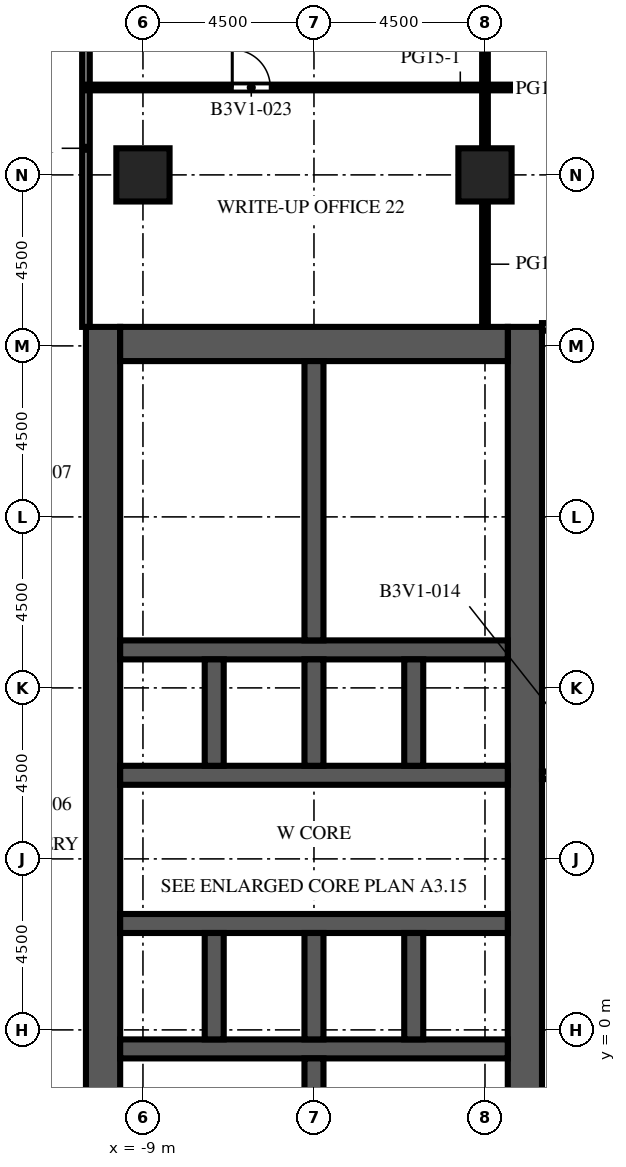
"""IFC4 building model, lengths in metres.
Left out: names, types, materials, properties, quantities, classifications, styles, units other than length and angle.
Written with IfcOpenShell. Run it as: python <this file> out.ifc"""

import sys

from ifc_helpers import new_model, si_unit, direction, frame, frame_2d, origin, origin_2d, place, context, subcontext, project, spatial, rectangle, extrude, element, fill, save


model = new_model("IFC4")
c1 = context("Model", 3, precision=1e-05, world=origin(), true_north=direction((0.0, 1.0)))
c2 = subcontext(c1, "Body", "Model", "MODEL_VIEW")
j1 = project(units=[si_unit("LENGTHUNIT", "METRE"), si_unit("PLANEANGLEUNIT", "RADIAN")], contexts=[c1])
p1 = place(None, origin())
s1 = spatial("IfcSite", under=j1, at=p1, CompositionType="ELEMENT")
p2 = place(p1, origin())
s2 = spatial("IfcBuilding", under=s1, at=p2, CompositionType="ELEMENT")
p3 = place(p2, frame((0.0, 0.0, 86.1)))
s3 = spatial("IfcBuildingStorey", under=s2, at=p3, CompositionType="ELEMENT", Elevation=86.1)
for number, where, z_axis, x_axis in (
    (1, (-9.0, 22.5, 0.0), (0.0, 0.0, 1.0), (1.0, 0.0, 0.0)),
    (2, (0.0, 22.5, 0.0), (0.0, 0.0, 1.0), (1.0, 0.0, 0.0)),
):
    element("IfcColumn", number, at=place(p3, frame(where, z_axis=z_axis, x_axis=x_axis)), inside=s3, PredefinedType="COLUMN", context=c2, shape_type="SweptSolid", body=[
        extrude(rectangle(XDim=1.4, YDim=1.4, at=origin_2d()), origin(), (0.0, 0.0, 1.0), 4.1),
    ])
p4 = place(p3, frame((-10.05, -9.0, 0.0), z_axis=(0.0, 0.0, 1.0), x_axis=(0.0, 1.0, 0.0)))
e3 = element("IfcWall", 3, at=p4, inside=s3, PredefinedType="SHEAR", context=c2, shape_type="SweptSolid", body=[
    extrude(rectangle(XDim=27.5, YDim=0.9, at=frame_2d((13.75, 0.0))), origin(), (0.0, 0.0, 1.0), 4.1),
])
p5 = place(p4, frame((12.55, 0.0, 0.0)))
e4 = element("IfcOpeningElement", 4, at=p5, cuts=e3, PredefinedType="OPENING", context=c2, shape_type="SweptSolid", body=[
    extrude(rectangle(XDim=2.4, YDim=2.4, at=frame_2d((1.2, 1.2))), frame((0.0, 0.46, 0.0), z_axis=(0.0, -1.0, 0.0), x_axis=(1.0, 0.0, 0.0)), (0.0, 0.0, 1.0), 0.92),
])
p6 = place(p4, frame((6.825, 0.0, 0.0)))
e5 = element("IfcOpeningElement", 5, at=p6, cuts=e3, PredefinedType="OPENING", context=c2, shape_type="SweptSolid", body=[
    extrude(rectangle(XDim=1.2, YDim=2.1, at=frame_2d((0.6, 1.05))), frame((0.0, 0.46, 0.0), z_axis=(0.0, -1.0, 0.0), x_axis=(1.0, 0.0, 0.0)), (0.0, 0.0, 1.0), 0.92),
])
p7 = place(p4, frame((19.475, 0.0, 0.0)))
e6 = element("IfcOpeningElement", 6, at=p7, cuts=e3, PredefinedType="OPENING", context=c2, shape_type="SweptSolid", body=[
    extrude(rectangle(XDim=1.2, YDim=2.1, at=frame_2d((0.6, 1.05))), frame((0.0, 0.46, 0.0), z_axis=(0.0, -1.0, 0.0), x_axis=(1.0, 0.0, 0.0)), (0.0, 0.0, 1.0), 0.92),
])
p8 = place(p3, frame((1.05, -9.0, 0.0), z_axis=(0.0, 0.0, 1.0), x_axis=(0.0, 1.0, 0.0)))
e7 = element("IfcWall", 7, at=p8, inside=s3, PredefinedType="SHEAR", context=c2, shape_type="SweptSolid", body=[
    extrude(rectangle(XDim=27.5, YDim=0.9, at=frame_2d((13.75, 0.0))), origin(), (0.0, 0.0, 1.0), 4.1),
])
p9 = place(p8, frame((12.55, 0.0, 0.0)))
e8 = element("IfcOpeningElement", 8, at=p9, cuts=e7, PredefinedType="OPENING", context=c2, shape_type="SweptSolid", body=[
    extrude(rectangle(XDim=2.4, YDim=2.4, at=frame_2d((1.2, 1.2))), frame((0.0, 0.46, 0.0), z_axis=(0.0, -1.0, 0.0), x_axis=(1.0, 0.0, 0.0)), (0.0, 0.0, 1.0), 0.92),
])
p10 = place(p8, frame((3.975, 0.0, 0.0)))
e9 = element("IfcOpeningElement", 9, at=p10, cuts=e7, PredefinedType="OPENING", context=c2, shape_type="SweptSolid", body=[
    extrude(rectangle(XDim=1.2, YDim=2.1, at=frame_2d((0.6, 1.05))), frame((0.0, 0.46, 0.0), z_axis=(0.0, -1.0, 0.0), x_axis=(1.0, 0.0, 0.0)), (0.0, 0.0, 1.0), 0.92),
])
p11 = place(p8, frame((22.325, 0.0, 0.0)))
e10 = element("IfcOpeningElement", 10, at=p11, cuts=e7, PredefinedType="OPENING", context=c2, shape_type="SweptSolid", body=[
    extrude(rectangle(XDim=1.2, YDim=2.1, at=frame_2d((0.6, 1.05))), frame((0.0, 0.46, 0.0), z_axis=(0.0, -1.0, 0.0), x_axis=(1.0, 0.0, 0.0)), (0.0, 0.0, 1.0), 0.92),
])
p12 = place(p3, frame((-9.6, 18.05, 0.0), z_axis=(0.0, 0.0, 1.0), x_axis=(1.0, 0.0, 0.0)))
e11 = element("IfcWall", 11, at=p12, inside=s3, PredefinedType="SHEAR", context=c2, shape_type="SweptSolid", body=[
    extrude(rectangle(XDim=10.2, YDim=0.9, at=frame_2d((5.1, 0.0))), origin(), (0.0, 0.0, 1.0), 4.1),
])
p13 = place(p3, frame((-9.6, -0.5, 0.0), z_axis=(0.0, 0.0, 1.0), x_axis=(1.0, 0.0, 0.0)))
e12 = element("IfcWall", 12, at=p13, inside=s3, PredefinedType="SHEAR", context=c2, shape_type="SweptSolid", body=[
    extrude(rectangle(XDim=10.2, YDim=0.5, at=frame_2d((5.1, 0.0))), origin(), (0.0, 0.0, 1.0), 4.1),
])
p14 = place(p3, frame((-9.6, 2.8, 0.0), z_axis=(0.0, 0.0, 1.0), x_axis=(1.0, 0.0, 0.0)))
e13 = element("IfcWall", 13, at=p14, inside=s3, PredefinedType="SHEAR", context=c2, shape_type="SweptSolid", body=[
    extrude(rectangle(XDim=10.2, YDim=0.5, at=frame_2d((5.1, 0.0))), origin(), (0.0, 0.0, 1.0), 4.1),
])
p15 = place(p14, frame((0.562, 0.0, 0.0)))
e14 = element("IfcOpeningElement", 14, at=p15, cuts=e13, PredefinedType="OPENING", context=c2, shape_type="SweptSolid", body=[
    extrude(rectangle(XDim=1.1, YDim=2.1, at=frame_2d((0.55, 1.05))), frame((0.0, 0.26, 0.0), z_axis=(0.0, -1.0, 0.0), x_axis=(1.0, 0.0, 0.0)), (0.0, 0.0, 1.0), 0.52),
])
p16 = place(p14, frame((3.238, 0.0, 0.0)))
e15 = element("IfcOpeningElement", 15, at=p16, cuts=e13, PredefinedType="OPENING", context=c2, shape_type="SweptSolid", body=[
    extrude(rectangle(XDim=1.1, YDim=2.1, at=frame_2d((0.55, 1.05))), frame((0.0, 0.26, 0.0), z_axis=(0.0, -1.0, 0.0), x_axis=(1.0, 0.0, 0.0)), (0.0, 0.0, 1.0), 0.52),
])
p17 = place(p14, frame((8.538, 0.0, 0.0)))
e16 = element("IfcOpeningElement", 16, at=p17, cuts=e13, PredefinedType="OPENING", context=c2, shape_type="SweptSolid", body=[
    extrude(rectangle(XDim=1.1, YDim=2.1, at=frame_2d((0.55, 1.05))), frame((0.0, 0.26, 0.0), z_axis=(0.0, -1.0, 0.0), x_axis=(1.0, 0.0, 0.0)), (0.0, 0.0, 1.0), 0.52),
])
p18 = place(p3, frame((-9.6, 6.7, 0.0), z_axis=(0.0, 0.0, 1.0), x_axis=(1.0, 0.0, 0.0)))
e17 = element("IfcWall", 17, at=p18, inside=s3, PredefinedType="SHEAR", context=c2, shape_type="SweptSolid", body=[
    extrude(rectangle(XDim=10.2, YDim=0.5, at=frame_2d((5.1, 0.0))), origin(), (0.0, 0.0, 1.0), 4.1),
])
p19 = place(p18, frame((0.562, 0.0, 0.0)))
e18 = element("IfcOpeningElement", 18, at=p19, cuts=e17, PredefinedType="OPENING", context=c2, shape_type="SweptSolid", body=[
    extrude(rectangle(XDim=1.1, YDim=2.1, at=frame_2d((0.55, 1.05))), frame((0.0, 0.26, 0.0), z_axis=(0.0, -1.0, 0.0), x_axis=(1.0, 0.0, 0.0)), (0.0, 0.0, 1.0), 0.52),
])
p20 = place(p18, frame((3.288, 0.0, 0.0)))
e19 = element("IfcOpeningElement", 19, at=p20, cuts=e17, PredefinedType="OPENING", context=c2, shape_type="SweptSolid", body=[
    extrude(rectangle(XDim=1.0, YDim=2.1, at=frame_2d((0.5, 1.05))), frame((0.0, 0.26, 0.0), z_axis=(0.0, -1.0, 0.0), x_axis=(1.0, 0.0, 0.0)), (0.0, 0.0, 1.0), 0.52),
])
p21 = place(p18, frame((5.913, 0.0, 0.0)))
e20 = element("IfcOpeningElement", 20, at=p21, cuts=e17, PredefinedType="OPENING", context=c2, shape_type="SweptSolid", body=[
    extrude(rectangle(XDim=1.0, YDim=2.1, at=frame_2d((0.5, 1.05))), frame((0.0, 0.26, 0.0), z_axis=(0.0, -1.0, 0.0), x_axis=(1.0, 0.0, 0.0)), (0.0, 0.0, 1.0), 0.52),
])
p22 = place(p18, frame((8.587, 0.0, 0.0)))
e21 = element("IfcOpeningElement", 21, at=p22, cuts=e17, PredefinedType="OPENING", context=c2, shape_type="SweptSolid", body=[
    extrude(rectangle(XDim=1.0, YDim=2.1, at=frame_2d((0.5, 1.05))), frame((0.0, 0.26, 0.0), z_axis=(0.0, -1.0, 0.0), x_axis=(1.0, 0.0, 0.0)), (0.0, 0.0, 1.0), 0.52),
])
p23 = place(p3, frame((-9.6, 10.0, 0.0), z_axis=(0.0, 0.0, 1.0), x_axis=(1.0, 0.0, 0.0)))
e22 = element("IfcWall", 22, at=p23, inside=s3, PredefinedType="SHEAR", context=c2, shape_type="SweptSolid", body=[
    extrude(rectangle(XDim=10.2, YDim=0.5, at=frame_2d((5.1, 0.0))), origin(), (0.0, 0.0, 1.0), 4.1),
])
for number, where, z_axis, x_axis in (
    (23, (-7.125, -0.25, 0.0), (0.0, 0.0, 1.0), (0.0, 1.0, 0.0)),
    (24, (-7.125, 6.95, 0.0), (0.0, 0.0, 1.0), (0.0, 1.0, 0.0)),
    (25, (-4.5, -0.25, 0.0), (0.0, 0.0, 1.0), (0.0, 1.0, 0.0)),
    (26, (-4.5, 6.95, 0.0), (0.0, 0.0, 1.0), (0.0, 1.0, 0.0)),
    (27, (-1.875, -0.25, 0.0), (0.0, 0.0, 1.0), (0.0, 1.0, 0.0)),
    (28, (-1.875, 6.95, 0.0), (0.0, 0.0, 1.0), (0.0, 1.0, 0.0)),
):
    element("IfcWall", number, at=place(p3, frame(where, z_axis=z_axis, x_axis=x_axis)), inside=s3, PredefinedType="SHEAR", context=c2, shape_type="SweptSolid", body=[
        extrude(rectangle(XDim=2.8, YDim=0.5, at=frame_2d((1.4, 0.0))), origin(), (0.0, 0.0, 1.0), 4.1),
    ])
for number, where, z_axis, x_axis in (
    (29, (-4.5, -8.1, 0.0), (0.0, 0.0, 1.0), (0.0, 1.0, 0.0)),
    (30, (-4.5, 10.25, 0.0), (0.0, 0.0, 1.0), (0.0, 1.0, 0.0)),
):
    element("IfcWall", number, at=place(p3, frame(where, z_axis=z_axis, x_axis=x_axis)), inside=s3, PredefinedType="SHEAR", context=c2, shape_type="SweptSolid", body=[
        extrude(rectangle(XDim=7.35, YDim=0.5, at=frame_2d((3.675, 0.0))), origin(), (0.0, 0.0, 1.0), 4.1),
    ])
p24 = place(p3, frame((-0.9, -3.543, 0.0), z_axis=(0.0, 0.0, 1.0), x_axis=(0.0, 1.0, 0.0)))
e31 = element("IfcWall", 31, at=p24, inside=s3, PredefinedType="PARTITIONING", context=c2, shape_type="SweptSolid", body=[
    extrude(rectangle(XDim=2.793, YDim=0.1, at=frame_2d((1.396, 0.0))), origin(), (0.0, 0.0, 1.0), 3.65),
])
p25 = place(p24, frame((0.896, 0.0, 0.0)))
e32 = element("IfcOpeningElement", 32, at=p25, cuts=e31, PredefinedType="OPENING", context=c2, shape_type="SweptSolid", body=[
    extrude(rectangle(XDim=1.0, YDim=2.1, at=frame_2d((0.5, 1.05))), frame((0.0, 0.06, 0.0), z_axis=(0.0, -1.0, 0.0), x_axis=(1.0, 0.0, 0.0)), (0.0, 0.0, 1.0), 0.12),
])
p26 = place(p3, frame((-0.8, 10.25, 0.0), z_axis=(0.0, 0.0, 1.0), x_axis=(0.0, 1.0, 0.0)))
e33 = element("IfcWall", 33, at=p26, inside=s3, PredefinedType="PARTITIONING", context=c2, shape_type="SweptSolid", body=[
    extrude(rectangle(XDim=2.205, YDim=0.1, at=frame_2d((1.103, 0.0))), origin(), (0.0, 0.0, 1.0), 3.65),
])
p27 = place(p26, frame((0.603, 0.0, 0.0)))
e34 = element("IfcOpeningElement", 34, at=p27, cuts=e33, PredefinedType="OPENING", context=c2, shape_type="SweptSolid", body=[
    extrude(rectangle(XDim=1.0, YDim=2.1, at=frame_2d((0.5, 1.05))), frame((0.0, 0.06, 0.0), z_axis=(0.0, -1.0, 0.0), x_axis=(1.0, 0.0, 0.0)), (0.0, 0.0, 1.0), 0.12),
])
p28 = place(p3, frame((-0.8, 12.455, 0.0), z_axis=(0.0, 0.0, 1.0), x_axis=(0.0, 1.0, 0.0)))
e35 = element("IfcWall", 35, at=p28, inside=s3, PredefinedType="PARTITIONING", context=c2, shape_type="SweptSolid", body=[
    extrude(rectangle(XDim=2.352, YDim=0.1, at=frame_2d((1.176, 0.0))), origin(), (0.0, 0.0, 1.0), 3.65),
])
p29 = place(p28, frame((0.676, 0.0, 0.0)))
e36 = element("IfcOpeningElement", 36, at=p29, cuts=e35, PredefinedType="OPENING", context=c2, shape_type="SweptSolid", body=[
    extrude(rectangle(XDim=1.0, YDim=2.1, at=frame_2d((0.5, 1.05))), frame((0.0, 0.06, 0.0), z_axis=(0.0, -1.0, 0.0), x_axis=(1.0, 0.0, 0.0)), (0.0, 0.0, 1.0), 0.12),
])
p30 = place(p3, frame((-0.8, 14.807, 0.0), z_axis=(0.0, 0.0, 1.0), x_axis=(0.0, 1.0, 0.0)))
e37 = element("IfcWall", 37, at=p30, inside=s3, PredefinedType="PARTITIONING", context=c2, shape_type="SweptSolid", body=[
    extrude(rectangle(XDim=2.793, YDim=0.1, at=frame_2d((1.396, 0.0))), origin(), (0.0, 0.0, 1.0), 3.65),
])
p31 = place(p30, frame((0.896, 0.0, 0.0)))
e38 = element("IfcOpeningElement", 38, at=p31, cuts=e37, PredefinedType="OPENING", context=c2, shape_type="SweptSolid", body=[
    extrude(rectangle(XDim=1.0, YDim=2.1, at=frame_2d((0.5, 1.05))), frame((0.0, 0.06, 0.0), z_axis=(0.0, -1.0, 0.0), x_axis=(1.0, 0.0, 0.0)), (0.0, 0.0, 1.0), 0.12),
])
for number, where, z_axis, x_axis in (
    (39, (-4.25, 12.455, 0.0), (0.0, 0.0, 1.0), (1.0, 0.0, 0.0)),
    (40, (-4.25, 14.807, 0.0), (0.0, 0.0, 1.0), (1.0, 0.0, 0.0)),
):
    element("IfcWall", number, at=place(p3, frame(where, z_axis=z_axis, x_axis=x_axis)), inside=s3, PredefinedType="PARTITIONING", context=c2, shape_type="SweptSolid", body=[
        extrude(rectangle(XDim=3.45, YDim=0.1, at=frame_2d((1.725, 0.0))), origin(), (0.0, 0.0, 1.0), 3.65),
    ])
p32 = place(p3, frame((-10.5, 31.35, 0.0), z_axis=(0.0, 0.0, 1.0), x_axis=(0.0, -1.0, 0.0)))
e41 = element("IfcWall", 41, at=p32, inside=s3, PredefinedType="PARTITIONING", context=c2, shape_type="SweptSolid", body=[
    extrude(rectangle(XDim=12.85, YDim=0.2, at=frame_2d((6.425, 0.0))), origin(), (0.0, 0.0, 1.0), 3.65),
])
p33 = place(p32, frame((2.45, 0.0, 0.0)))
e42 = element("IfcOpeningElement", 42, at=p33, cuts=e41, PredefinedType="OPENING", context=c2, shape_type="SweptSolid", body=[
    extrude(rectangle(XDim=1.0, YDim=2.1, at=frame_2d((0.5, 1.05))), frame((0.0, 0.11, 0.0), z_axis=(0.0, -1.0, 0.0), x_axis=(1.0, 0.0, 0.0)), (0.0, 0.0, 1.0), 0.22),
])
p34 = place(p3, frame((0.0, 18.5, 0.0), z_axis=(0.0, 0.0, 1.0), x_axis=(0.0, 1.0, 0.0)))
e43 = element("IfcWall", 43, at=p34, inside=s3, PredefinedType="PARTITIONING", context=c2, shape_type="SweptSolid", body=[
    extrude(rectangle(XDim=3.3, YDim=0.15, at=frame_2d((1.65, 0.0))), origin(), (0.0, 0.0, 1.0), 3.65),
])
p35 = place(p3, frame((0.0, 23.2, 0.0), z_axis=(0.0, 0.0, 1.0), x_axis=(0.0, 1.0, 0.0)))
e44 = element("IfcWall", 44, at=p35, inside=s3, PredefinedType="PARTITIONING", context=c2, shape_type="SweptSolid", body=[
    extrude(rectangle(XDim=3.1, YDim=0.15, at=frame_2d((1.55, 0.0))), origin(), (0.0, 0.0, 1.0), 3.65),
])
p36 = place(p3, frame((1.5, 6.7, 0.0), z_axis=(0.0, 0.0, 1.0), x_axis=(1.0, 0.0, 0.0)))
e45 = element("IfcWall", 45, at=p36, inside=s3, PredefinedType="PARTITIONING", context=c2, shape_type="SweptSolid", body=[
    extrude(rectangle(XDim=4.5, YDim=0.2, at=frame_2d((2.25, 0.0))), origin(), (0.0, 0.0, 1.0), 3.65),
])
p37 = place(p36, frame((1.1, 0.0, 0.0)))
e46 = element("IfcOpeningElement", 46, at=p37, cuts=e45, PredefinedType="OPENING", context=c2, shape_type="SweptSolid", body=[
    extrude(rectangle(XDim=1.0, YDim=2.1, at=frame_2d((0.5, 1.05))), frame((0.0, 0.11, 0.0), z_axis=(0.0, -1.0, 0.0), x_axis=(1.0, 0.0, 0.0)), (0.0, 0.0, 1.0), 0.22),
])
p38 = place(p3, frame((1.5, 18.5, 0.0), z_axis=(0.0, 0.0, 1.0), x_axis=(1.0, 0.0, 0.0)))
e47 = element("IfcWall", 47, at=p38, inside=s3, PredefinedType="PARTITIONING", context=c2, shape_type="SweptSolid", body=[
    extrude(rectangle(XDim=4.5, YDim=0.2, at=frame_2d((2.25, 0.0))), origin(), (0.0, 0.0, 1.0), 3.65),
])
p39 = place(p3, frame((18.0, 24.8, 0.0), z_axis=(0.0, 0.0, 1.0), x_axis=(-1.0, 0.0, 0.0)))
e48 = element("IfcWall", 48, at=p39, inside=s3, PredefinedType="PARTITIONING", context=c2, shape_type="SweptSolid", body=[
    extrude(rectangle(XDim=28.5, YDim=0.15, at=frame_2d((14.25, 0.0))), origin(), (0.0, 0.0, 1.0), 3.65),
])
p40 = place(p39, frame((23.65, 0.0, 0.0)))
e49 = element("IfcOpeningElement", 49, at=p40, cuts=e48, PredefinedType="OPENING", context=c2, shape_type="SweptSolid", body=[
    extrude(rectangle(XDim=1.0, YDim=2.1, at=frame_2d((0.5, 1.05))), frame((0.0, 0.085, 0.0), z_axis=(0.0, -1.0, 0.0), x_axis=(1.0, 0.0, 0.0)), (0.0, 0.0, 1.0), 0.17),
])
p41 = place(p39, frame((12.65, 0.0, 0.0)))
e50 = element("IfcOpeningElement", 50, at=p41, cuts=e48, PredefinedType="OPENING", context=c2, shape_type="SweptSolid", body=[
    extrude(rectangle(XDim=1.0, YDim=2.1, at=frame_2d((0.5, 1.05))), frame((0.0, 0.085, 0.0), z_axis=(0.0, -1.0, 0.0), x_axis=(1.0, 0.0, 0.0)), (0.0, 0.0, 1.0), 0.17),
])
p42 = place(p39, frame((1.9, 0.0, 0.0)))
e51 = element("IfcOpeningElement", 51, at=p42, cuts=e48, PredefinedType="OPENING", context=c2, shape_type="SweptSolid", body=[
    extrude(rectangle(XDim=1.0, YDim=2.1, at=frame_2d((0.5, 1.05))), frame((0.0, 0.085, 0.0), z_axis=(0.0, -1.0, 0.0), x_axis=(1.0, 0.0, 0.0)), (0.0, 0.0, 1.0), 0.17),
])
p43 = place(p15, origin())
e52 = element("IfcDoor", 52, at=p43, inside=s3, OperationType="DOUBLE_DOOR_SLIDING", PredefinedType="DOOR", context=c2, shape_type="SweptSolid", body=[
    extrude(rectangle(XDim=1.1, YDim=2.1, at=frame_2d((0.55, 1.05))), frame((0.0, 0.025, 0.0), z_axis=(0.0, -1.0, 0.0), x_axis=(1.0, 0.0, 0.0)), (0.0, 0.0, 1.0), 0.05),
])
fill(e14, e52)
p44 = place(p16, origin())
e53 = element("IfcDoor", 53, at=p44, inside=s3, OperationType="DOUBLE_DOOR_SLIDING", PredefinedType="DOOR", context=c2, shape_type="SweptSolid", body=[
    extrude(rectangle(XDim=1.1, YDim=2.1, at=frame_2d((0.55, 1.05))), frame((0.0, 0.025, 0.0), z_axis=(0.0, -1.0, 0.0), x_axis=(1.0, 0.0, 0.0)), (0.0, 0.0, 1.0), 0.05),
])
fill(e15, e53)
p45 = place(p17, origin())
e54 = element("IfcDoor", 54, at=p45, inside=s3, OperationType="DOUBLE_DOOR_SLIDING", PredefinedType="DOOR", context=c2, shape_type="SweptSolid", body=[
    extrude(rectangle(XDim=1.1, YDim=2.1, at=frame_2d((0.55, 1.05))), frame((0.0, 0.025, 0.0), z_axis=(0.0, -1.0, 0.0), x_axis=(1.0, 0.0, 0.0)), (0.0, 0.0, 1.0), 0.05),
])
fill(e16, e54)
p46 = place(p19, origin())
e55 = element("IfcDoor", 55, at=p46, inside=s3, OperationType="DOUBLE_DOOR_SLIDING", PredefinedType="DOOR", context=c2, shape_type="SweptSolid", body=[
    extrude(rectangle(XDim=1.1, YDim=2.1, at=frame_2d((0.55, 1.05))), frame((0.0, 0.025, 0.0), z_axis=(0.0, -1.0, 0.0), x_axis=(1.0, 0.0, 0.0)), (0.0, 0.0, 1.0), 0.05),
])
fill(e18, e55)
p47 = place(p5, origin())
e56 = element("IfcDoor", 56, at=p47, inside=s3, OperationType="DOUBLE_DOOR_DOUBLE_SWING", PredefinedType="DOOR", context=c2, shape_type="SweptSolid", body=[
    extrude(rectangle(XDim=2.4, YDim=2.4, at=frame_2d((1.2, 1.2))), frame((0.0, 0.025, 0.0), z_axis=(0.0, -1.0, 0.0), x_axis=(1.0, 0.0, 0.0)), (0.0, 0.0, 1.0), 0.05),
])
fill(e4, e56)
p48 = place(p9, origin())
e57 = element("IfcDoor", 57, at=p48, inside=s3, OperationType="DOUBLE_DOOR_DOUBLE_SWING", PredefinedType="DOOR", context=c2, shape_type="SweptSolid", body=[
    extrude(rectangle(XDim=2.4, YDim=2.4, at=frame_2d((1.2, 1.2))), frame((0.0, 0.025, 0.0), z_axis=(0.0, -1.0, 0.0), x_axis=(1.0, 0.0, 0.0)), (0.0, 0.0, 1.0), 0.05),
])
fill(e8, e57)
p49 = place(p6, origin())
e58 = element("IfcDoor", 58, at=p49, inside=s3, OperationType="SINGLE_SWING_LEFT", PredefinedType="DOOR", context=c2, shape_type="SweptSolid", body=[
    extrude(rectangle(XDim=1.2, YDim=2.1, at=frame_2d((0.6, 1.05))), frame((0.0, 0.025, 0.0), z_axis=(0.0, -1.0, 0.0), x_axis=(1.0, 0.0, 0.0)), (0.0, 0.0, 1.0), 0.05),
])
fill(e5, e58)
p50 = place(p7, origin())
e59 = element("IfcDoor", 59, at=p50, inside=s3, OperationType="SINGLE_SWING_LEFT", PredefinedType="DOOR", context=c2, shape_type="SweptSolid", body=[
    extrude(rectangle(XDim=1.2, YDim=2.1, at=frame_2d((0.6, 1.05))), frame((0.0, 0.025, 0.0), z_axis=(0.0, -1.0, 0.0), x_axis=(1.0, 0.0, 0.0)), (0.0, 0.0, 1.0), 0.05),
])
fill(e6, e59)
p51 = place(p20, origin())
e60 = element("IfcDoor", 60, at=p51, inside=s3, OperationType="SINGLE_SWING_RIGHT", PredefinedType="DOOR", context=c2, shape_type="SweptSolid", body=[
    extrude(rectangle(XDim=1.0, YDim=2.1, at=frame_2d((0.5, 1.05))), frame((0.0, 0.025, 0.0), z_axis=(0.0, -1.0, 0.0), x_axis=(1.0, 0.0, 0.0)), (0.0, 0.0, 1.0), 0.05),
])
fill(e19, e60)
p52 = place(p21, origin())
e61 = element("IfcDoor", 61, at=p52, inside=s3, OperationType="SINGLE_SWING_LEFT", PredefinedType="DOOR", context=c2, shape_type="SweptSolid", body=[
    extrude(rectangle(XDim=1.0, YDim=2.1, at=frame_2d((0.5, 1.05))), frame((0.0, 0.025, 0.0), z_axis=(0.0, -1.0, 0.0), x_axis=(1.0, 0.0, 0.0)), (0.0, 0.0, 1.0), 0.05),
])
fill(e20, e61)
p53 = place(p22, origin())
e62 = element("IfcDoor", 62, at=p53, inside=s3, OperationType="SINGLE_SWING_RIGHT", PredefinedType="DOOR", context=c2, shape_type="SweptSolid", body=[
    extrude(rectangle(XDim=1.0, YDim=2.1, at=frame_2d((0.5, 1.05))), frame((0.0, 0.025, 0.0), z_axis=(0.0, -1.0, 0.0), x_axis=(1.0, 0.0, 0.0)), (0.0, 0.0, 1.0), 0.05),
])
fill(e21, e62)
p54 = place(p11, origin())
e63 = element("IfcDoor", 63, at=p54, inside=s3, OperationType="SINGLE_SWING_LEFT", PredefinedType="DOOR", context=c2, shape_type="SweptSolid", body=[
    extrude(rectangle(XDim=1.2, YDim=2.1, at=frame_2d((0.6, 1.05))), frame((0.0, 0.425, 0.0), z_axis=(0.0, -1.0, 0.0), x_axis=(1.0, 0.0, 0.0)), (0.0, 0.0, 1.0), 0.05),
])
fill(e10, e63)
p55 = place(p27, origin())
e64 = element("IfcDoor", 64, at=p55, inside=s3, OperationType="SINGLE_SWING_RIGHT", PredefinedType="DOOR", context=c2, shape_type="SweptSolid", body=[
    extrude(rectangle(XDim=1.0, YDim=2.1, at=frame_2d((0.5, 1.05))), frame((0.0, 0.025, 0.0), z_axis=(0.0, -1.0, 0.0), x_axis=(1.0, 0.0, 0.0)), (0.0, 0.0, 1.0), 0.05),
])
fill(e34, e64)
p56 = place(p29, origin())
e65 = element("IfcDoor", 65, at=p56, inside=s3, OperationType="SINGLE_SWING_LEFT", PredefinedType="DOOR", context=c2, shape_type="SweptSolid", body=[
    extrude(rectangle(XDim=1.0, YDim=2.1, at=frame_2d((0.5, 1.05))), frame((0.0, 0.025, 0.0), z_axis=(0.0, -1.0, 0.0), x_axis=(1.0, 0.0, 0.0)), (0.0, 0.0, 1.0), 0.05),
])
fill(e36, e65)
p57 = place(p31, origin())
e66 = element("IfcDoor", 66, at=p57, inside=s3, OperationType="SINGLE_SWING_RIGHT", PredefinedType="DOOR", context=c2, shape_type="SweptSolid", body=[
    extrude(rectangle(XDim=1.0, YDim=2.1, at=frame_2d((0.5, 1.05))), frame((0.0, 0.025, 0.0), z_axis=(0.0, -1.0, 0.0), x_axis=(1.0, 0.0, 0.0)), (0.0, 0.0, 1.0), 0.05),
])
fill(e38, e66)
p58 = place(p40, origin())
e67 = element("IfcDoor", 67, at=p58, inside=s3, OperationType="SINGLE_SWING_RIGHT", PredefinedType="DOOR", context=c2, shape_type="SweptSolid", body=[
    extrude(rectangle(XDim=1.0, YDim=2.1, at=frame_2d((0.5, 1.05))), frame((0.0, 0.025, 0.0), z_axis=(0.0, -1.0, 0.0), x_axis=(1.0, 0.0, 0.0)), (0.0, 0.0, 1.0), 0.05),
])
fill(e49, e67)
save(model, sys.argv[1])
